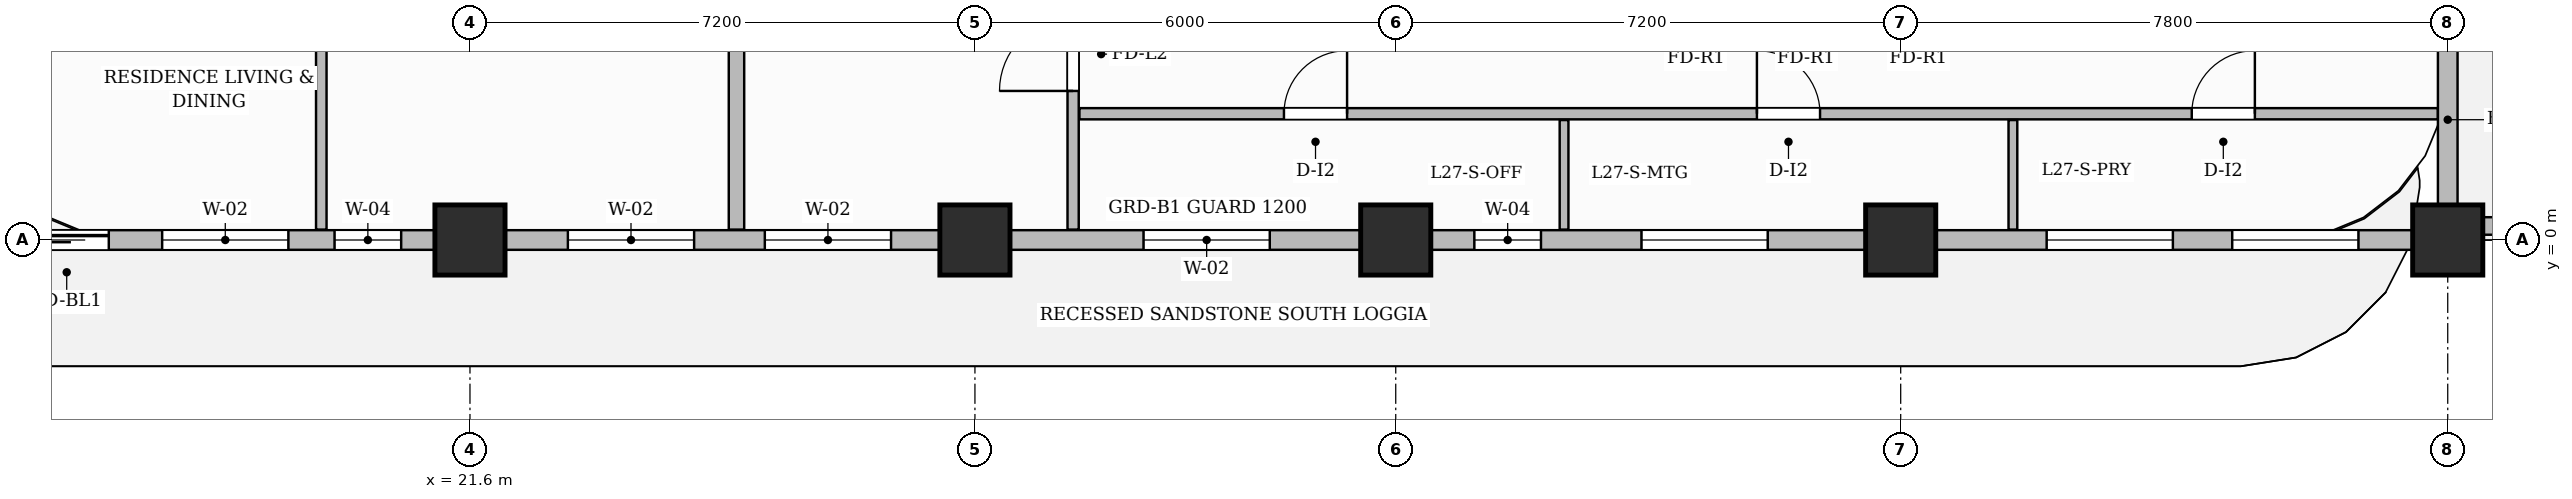
"""IFC4 building model, lengths in metres.
Left out: names, types, materials, properties, quantities, classifications, styles, units other than length and angle.
Written with IfcOpenShell. Run it as: python <this file> out.ifc"""

import sys

from ifc_helpers import new_model, si_unit, direction, frame, frame_2d, origin, origin_2d, place, context, subcontext, project, spatial, rectangle, extrude, source, transform, mapped, element, fill, save


model = new_model("IFC4")
c1 = context("Model", 3, precision=1e-05, world=origin(), true_north=direction((0.0, 1.0)))
c2 = subcontext(c1, "Body", "Model", "MODEL_VIEW")
j1 = project(units=[si_unit("LENGTHUNIT", "METRE"), si_unit("PLANEANGLEUNIT", "RADIAN")], contexts=[c1])
p1 = place(None, origin())
s1 = spatial("IfcSite", under=j1, at=p1, CompositionType="ELEMENT")
p2 = place(p1, origin())
s2 = spatial("IfcBuilding", under=s1, at=p2, CompositionType="ELEMENT")
p3 = place(p2, frame((0.0, 0.0, 111.8)))
s3 = spatial("IfcBuildingStorey", under=s2, at=p3, CompositionType="ELEMENT", Elevation=111.8)
m1 = source(origin(), c2, "Body", "SweptSolid", [
    extrude(rectangle(XDim=1.0, YDim=1.0, at=origin_2d()), origin(), (0.0, 0.0, 1.0), 3.7),
])
for number, where, z_axis, x_axis in (
    (1, (21.6, 0.0, 0.0), (0.0, 0.0, 1.0), (1.0, 0.0, 0.0)),
    (2, (28.8, 0.0, 0.0), (0.0, 0.0, 1.0), (1.0, 0.0, 0.0)),
    (3, (34.8, 0.0, 0.0), (0.0, 0.0, 1.0), (1.0, 0.0, 0.0)),
    (4, (42.0, 0.0, 0.0), (0.0, 0.0, 1.0), (1.0, 0.0, 0.0)),
    (5, (49.8, 0.0, 0.0), (0.0, 0.0, 1.0), (1.0, 0.0, 0.0)),
):
    element("IfcColumn", number, at=place(p3, frame(where, z_axis=z_axis, x_axis=x_axis)), inside=s3, PredefinedType="COLUMN", context=c2, shape_type="MappedRepresentation", body=[
        mapped(m1, transform((0.0, 0.0, 0.0), scale=1.0)),
    ])
p4 = place(p3, frame((30.2, 0.148, 0.0), z_axis=(0.0, 0.0, 1.0), x_axis=(0.0, 1.0, 0.0)))
e6 = element("IfcWall", 6, at=p4, inside=s3, PredefinedType="PARTITIONING", context=c2, shape_type="SweptSolid", body=[
    extrude(rectangle(XDim=9.512, YDim=0.16, at=frame_2d((4.756, 0.0))), origin(), (0.0, 0.0, 1.0), 3.45),
])
p5 = place(p4, frame((1.977, 0.0, 0.0)))
e7 = element("IfcOpeningElement", 7, at=p5, cuts=e6, PredefinedType="OPENING", context=c2, shape_type="SweptSolid", body=[
    extrude(rectangle(XDim=1.05, YDim=2.15, at=frame_2d((0.525, 1.075))), frame((0.0, 0.09, 0.0), z_axis=(0.0, -1.0, 0.0), x_axis=(1.0, 0.0, 0.0)), (0.0, 0.0, 1.0), 0.18),
])
p6 = place(p3, frame((30.29, 1.8, 0.0), z_axis=(0.0, 0.0, 1.0), x_axis=(1.0, 0.0, 0.0)))
e8 = element("IfcWall", 8, at=p6, inside=s3, PredefinedType="PARTITIONING", context=c2, shape_type="SweptSolid", body=[
    extrude(rectangle(XDim=19.37, YDim=0.16, at=frame_2d((9.685, 0.0))), origin(), (0.0, 0.0, 1.0), 3.45),
])
p7 = place(p6, frame((2.916, 0.0, 0.0)))
e9 = element("IfcOpeningElement", 9, at=p7, cuts=e8, PredefinedType="OPENING", context=c2, shape_type="SweptSolid", body=[
    extrude(rectangle(XDim=0.9, YDim=2.15, at=frame_2d((0.45, 1.075))), frame((0.0, 0.09, 0.0), z_axis=(0.0, -1.0, 0.0), x_axis=(1.0, 0.0, 0.0)), (0.0, 0.0, 1.0), 0.18),
])
p8 = place(p6, frame((9.66, 0.0, 0.0)))
e10 = element("IfcOpeningElement", 10, at=p8, cuts=e8, PredefinedType="OPENING", context=c2, shape_type="SweptSolid", body=[
    extrude(rectangle(XDim=0.9, YDim=2.15, at=frame_2d((0.45, 1.075))), frame((0.0, 0.09, 0.0), z_axis=(0.0, -1.0, 0.0), x_axis=(1.0, 0.0, 0.0)), (0.0, 0.0, 1.0), 0.18),
])
p9 = place(p6, frame((15.86, 0.0, 0.0)))
e11 = element("IfcOpeningElement", 11, at=p9, cuts=e8, PredefinedType="OPENING", context=c2, shape_type="SweptSolid", body=[
    extrude(rectangle(XDim=0.9, YDim=2.15, at=frame_2d((0.45, 1.075))), frame((0.0, 0.09, 0.0), z_axis=(0.0, -1.0, 0.0), x_axis=(1.0, 0.0, 0.0)), (0.0, 0.0, 1.0), 0.18),
])
for number, where, z_axis, x_axis in (
    (12, (37.2, 0.148, 0.0), (0.0, 0.0, 1.0), (0.0, 1.0, 0.0)),
    (13, (43.6, 0.148, 0.0), (0.0, 0.0, 1.0), (0.0, 1.0, 0.0)),
):
    element("IfcWall", number, at=place(p3, frame(where, z_axis=z_axis, x_axis=x_axis)), inside=s3, PredefinedType="PARTITIONING", context=c2, shape_type="SweptSolid", body=[
        extrude(rectangle(XDim=1.562, YDim=0.125, at=frame_2d((0.781, 0.0))), origin(), (0.0, 0.0, 1.0), 3.45),
    ])
p10 = place(p3, frame((25.4, 0.148, 0.0), z_axis=(0.0, 0.0, 1.0), x_axis=(0.0, 1.0, 0.0)))
e14 = element("IfcWall", 14, at=p10, inside=s3, PredefinedType="PARTITIONING", context=c2, shape_type="SweptSolid", body=[
    extrude(rectangle(XDim=9.512, YDim=0.22, at=frame_2d((4.756, 0.0))), origin(), (0.0, 0.0, 1.0), 3.105),
])
p11 = place(p3, frame((19.48, 0.148, 0.0), z_axis=(0.0, 0.0, 1.0), x_axis=(0.0, 1.0, 0.0)))
e15 = element("IfcWall", 15, at=p11, inside=s3, PredefinedType="PARTITIONING", context=c2, shape_type="SweptSolid", body=[
    extrude(rectangle(XDim=9.512, YDim=0.15, at=frame_2d((4.756, 0.0))), origin(), (0.0, 0.0, 1.0), 3.45),
])
p12 = place(p11, frame((8.077, 0.0, 0.0)))
e16 = element("IfcOpeningElement", 16, at=p12, cuts=e15, PredefinedType="OPENING", context=c2, shape_type="SweptSolid", body=[
    extrude(rectangle(XDim=0.9, YDim=2.15, at=frame_2d((0.45, 1.075))), frame((0.0, 0.085, 0.0), z_axis=(0.0, -1.0, 0.0), x_axis=(1.0, 0.0, 0.0)), (0.0, 0.0, 1.0), 0.17),
])
p13 = place(p3, frame((14.4, 0.0, 0.0), z_axis=(0.0, 0.0, 1.0), x_axis=(1.0, 0.0, 0.0)))
e17 = element("IfcWall", 17, at=p13, inside=s3, PredefinedType="SOLIDWALL", context=c2, shape_type="SweptSolid", body=[
    extrude(rectangle(XDim=35.4, YDim=0.28, at=frame_2d((17.7, 0.0))), origin(), (0.0, 0.0, 1.0), 2.935),
])
p14 = place(p13, frame((0.85, 0.0, 0.0)))
e18 = element("IfcOpeningElement", 18, at=p14, cuts=e17, PredefinedType="OPENING", context=c2, shape_type="SweptSolid", body=[
    extrude(rectangle(XDim=1.2, YDim=2.2, at=frame_2d((0.6, 1.1))), frame((0.0, 0.15, 0.0), z_axis=(0.0, -1.0, 0.0), x_axis=(1.0, 0.0, 0.0)), (0.0, 0.0, 1.0), 0.3),
])
p15 = place(p13, frame((2.811, 0.0, 0.8)))
e19 = element("IfcOpeningElement", 19, at=p15, cuts=e17, PredefinedType="OPENING", context=c2, shape_type="SweptSolid", body=[
    extrude(rectangle(XDim=1.8, YDim=1.85, at=frame_2d((0.9, 0.925))), frame((0.0, 0.15, 0.0), z_axis=(0.0, -1.0, 0.0), x_axis=(1.0, 0.0, 0.0)), (0.0, 0.0, 1.0), 0.3),
])
p16 = place(p13, frame((5.269, 0.0, 0.8)))
e20 = element("IfcOpeningElement", 20, at=p16, cuts=e17, PredefinedType="OPENING", context=c2, shape_type="SweptSolid", body=[
    extrude(rectangle(XDim=0.95, YDim=1.75, at=frame_2d((0.475, 0.875))), frame((0.0, 0.15, 0.0), z_axis=(0.0, -1.0, 0.0), x_axis=(1.0, 0.0, 0.0)), (0.0, 0.0, 1.0), 0.3),
])
p17 = place(p13, frame((8.596, 0.0, 0.8)))
e21 = element("IfcOpeningElement", 21, at=p17, cuts=e17, PredefinedType="OPENING", context=c2, shape_type="SweptSolid", body=[
    extrude(rectangle(XDim=1.8, YDim=1.85, at=frame_2d((0.9, 0.925))), frame((0.0, 0.15, 0.0), z_axis=(0.0, -1.0, 0.0), x_axis=(1.0, 0.0, 0.0)), (0.0, 0.0, 1.0), 0.3),
])
p18 = place(p13, frame((11.404, 0.0, 0.8)))
e22 = element("IfcOpeningElement", 22, at=p18, cuts=e17, PredefinedType="OPENING", context=c2, shape_type="SweptSolid", body=[
    extrude(rectangle(XDim=1.8, YDim=1.85, at=frame_2d((0.9, 0.925))), frame((0.0, 0.15, 0.0), z_axis=(0.0, -1.0, 0.0), x_axis=(1.0, 0.0, 0.0)), (0.0, 0.0, 1.0), 0.3),
])
p19 = place(p13, frame((16.804, 0.0, 0.8)))
e23 = element("IfcOpeningElement", 23, at=p19, cuts=e17, PredefinedType="OPENING", context=c2, shape_type="SweptSolid", body=[
    extrude(rectangle(XDim=1.8, YDim=1.85, at=frame_2d((0.9, 0.925))), frame((0.0, 0.15, 0.0), z_axis=(0.0, -1.0, 0.0), x_axis=(1.0, 0.0, 0.0)), (0.0, 0.0, 1.0), 0.3),
])
p20 = place(p13, frame((21.521, 0.0, 0.8)))
e24 = element("IfcOpeningElement", 24, at=p20, cuts=e17, PredefinedType="OPENING", context=c2, shape_type="SweptSolid", body=[
    extrude(rectangle(XDim=0.95, YDim=1.75, at=frame_2d((0.475, 0.875))), frame((0.0, 0.15, 0.0), z_axis=(0.0, -1.0, 0.0), x_axis=(1.0, 0.0, 0.0)), (0.0, 0.0, 1.0), 0.3),
])
p21 = place(p13, frame((23.904, 0.0, 0.8)))
e25 = element("IfcOpeningElement", 25, at=p21, cuts=e17, PredefinedType="OPENING", context=c2, shape_type="SweptSolid", body=[
    extrude(rectangle(XDim=1.8, YDim=1.85, at=frame_2d((0.9, 0.925))), frame((0.0, 0.15, 0.0), z_axis=(0.0, -1.0, 0.0), x_axis=(1.0, 0.0, 0.0)), (0.0, 0.0, 1.0), 0.3),
])
p22 = place(p13, frame((29.681, 0.0, 0.8)))
e26 = element("IfcOpeningElement", 26, at=p22, cuts=e17, PredefinedType="OPENING", context=c2, shape_type="SweptSolid", body=[
    extrude(rectangle(XDim=1.8, YDim=1.85, at=frame_2d((0.9, 0.925))), frame((0.0, 0.15, 0.0), z_axis=(0.0, -1.0, 0.0), x_axis=(1.0, 0.0, 0.0)), (0.0, 0.0, 1.0), 0.3),
])
p23 = place(p13, frame((32.327, 0.0, 0.8)))
e27 = element("IfcOpeningElement", 27, at=p23, cuts=e17, PredefinedType="OPENING", context=c2, shape_type="SweptSolid", body=[
    extrude(rectangle(XDim=1.8, YDim=1.85, at=frame_2d((0.9, 0.925))), frame((0.0, 0.15, 0.0), z_axis=(0.0, -1.0, 0.0), x_axis=(1.0, 0.0, 0.0)), (0.0, 0.0, 1.0), 0.3),
])
p24 = place(p3, frame((49.8, 0.05, 0.0), z_axis=(0.0, 0.0, 1.0), x_axis=(0.0, 1.0, 0.0)))
e28 = element("IfcWall", 28, at=p24, inside=s3, PredefinedType="SOLIDWALL", context=c2, shape_type="SweptSolid", body=[
    extrude(rectangle(XDim=3.33, YDim=0.28, at=frame_2d((1.665, 0.0))), origin(), (0.0, 0.0, 1.0), 3.45),
])
p25 = place(p3, frame((55.187, 0.2, 0.0), z_axis=(0.0, 0.0, 1.0), x_axis=(-1.0, 0.0, 0.0)))
e29 = element("IfcWall", 29, at=p25, inside=s3, PredefinedType="PARAPET", context=c2, shape_type="SweptSolid", body=[
    extrude(rectangle(XDim=5.127, YDim=0.25, at=frame_2d((2.563, 0.0))), origin(), (0.0, 0.0, 1.0), 0.95),
])
m2 = source(origin(), c2, "Body", "SweptSolid", [
    extrude(rectangle(XDim=1.05, YDim=2.15, at=frame_2d((0.525, 1.075))), frame((0.0, 0.025, 0.0), z_axis=(0.0, -1.0, 0.0), x_axis=(1.0, 0.0, 0.0)), (0.0, 0.0, 1.0), 0.05),
])
p26 = place(p5, origin())
e30 = element("IfcDoor", 30, at=p26, inside=s3, OperationType="SINGLE_SWING_LEFT", PredefinedType="DOOR", context=c2, shape_type="MappedRepresentation", body=[
    mapped(m2, transform((0.0, 0.0, 0.0), scale=1.0)),
])
fill(e7, e30)
m3 = source(origin(), c2, "Body", "SweptSolid", [
    extrude(rectangle(XDim=0.9, YDim=2.15, at=frame_2d((0.45, 1.075))), frame((0.0, 0.025, 0.0), z_axis=(0.0, -1.0, 0.0), x_axis=(1.0, 0.0, 0.0)), (0.0, 0.0, 1.0), 0.05),
])
p27 = place(p7, origin())
e31 = element("IfcDoor", 31, at=p27, inside=s3, OperationType="SINGLE_SWING_RIGHT", PredefinedType="DOOR", context=c2, shape_type="MappedRepresentation", body=[
    mapped(m3, transform((0.0, 0.0, 0.0), scale=1.0)),
])
fill(e9, e31)
p28 = place(p8, origin())
e32 = element("IfcDoor", 32, at=p28, inside=s3, OperationType="SINGLE_SWING_LEFT", PredefinedType="DOOR", context=c2, shape_type="MappedRepresentation", body=[
    mapped(m3, transform((0.0, 0.0, 0.0), scale=1.0)),
])
fill(e10, e32)
p29 = place(p9, origin())
e33 = element("IfcDoor", 33, at=p29, inside=s3, OperationType="SINGLE_SWING_RIGHT", PredefinedType="DOOR", context=c2, shape_type="MappedRepresentation", body=[
    mapped(m3, transform((0.0, 0.0, 0.0), scale=1.0)),
])
fill(e11, e33)
m4 = source(origin(), c2, "Body", "SweptSolid", [
    extrude(rectangle(XDim=1.2, YDim=2.2, at=frame_2d((0.6, 1.1))), frame((0.0, 0.025, 0.0), z_axis=(0.0, -1.0, 0.0), x_axis=(1.0, 0.0, 0.0)), (0.0, 0.0, 1.0), 0.05),
])
p30 = place(p14, origin())
e34 = element("IfcDoor", 34, at=p30, inside=s3, OperationType="SLIDING_TO_LEFT", PredefinedType="DOOR", context=c2, shape_type="MappedRepresentation", body=[
    mapped(m4, transform((0.0, 0.0, 0.0), scale=1.0)),
])
fill(e18, e34)
m5 = source(origin(), c2, "Body", "SweptSolid", [
    extrude(rectangle(XDim=1.8, YDim=1.85, at=frame_2d((0.9, 0.925))), frame((0.0, 0.03, 0.0), z_axis=(0.0, -1.0, 0.0), x_axis=(1.0, 0.0, 0.0)), (0.0, 0.0, 1.0), 0.06),
])
p31 = place(p15, origin())
e35 = element("IfcWindow", 35, at=p31, inside=s3, PartitioningType="DOUBLE_PANEL_VERTICAL", PredefinedType="WINDOW", context=c2, shape_type="MappedRepresentation", body=[
    mapped(m5, transform((0.0, 0.0, 0.0), scale=1.0)),
])
fill(e19, e35)
m6 = source(origin(), c2, "Body", "SweptSolid", [
    extrude(rectangle(XDim=0.95, YDim=1.75, at=frame_2d((0.475, 0.875))), frame((0.0, 0.03, 0.0), z_axis=(0.0, -1.0, 0.0), x_axis=(1.0, 0.0, 0.0)), (0.0, 0.0, 1.0), 0.06),
])
p32 = place(p16, origin())
e36 = element("IfcWindow", 36, at=p32, inside=s3, PartitioningType="SINGLE_PANEL", PredefinedType="WINDOW", context=c2, shape_type="MappedRepresentation", body=[
    mapped(m6, transform((0.0, 0.0, 0.0), scale=1.0)),
])
fill(e20, e36)
p33 = place(p17, origin())
e37 = element("IfcWindow", 37, at=p33, inside=s3, PartitioningType="DOUBLE_PANEL_VERTICAL", PredefinedType="WINDOW", context=c2, shape_type="MappedRepresentation", body=[
    mapped(m5, transform((0.0, 0.0, 0.0), scale=1.0)),
])
fill(e21, e37)
p34 = place(p18, origin())
e38 = element("IfcWindow", 38, at=p34, inside=s3, PartitioningType="DOUBLE_PANEL_VERTICAL", PredefinedType="WINDOW", context=c2, shape_type="MappedRepresentation", body=[
    mapped(m5, transform((0.0, 0.0, 0.0), scale=1.0)),
])
fill(e22, e38)
p35 = place(p19, origin())
e39 = element("IfcWindow", 39, at=p35, inside=s3, PartitioningType="DOUBLE_PANEL_VERTICAL", PredefinedType="WINDOW", context=c2, shape_type="MappedRepresentation", body=[
    mapped(m5, transform((0.0, 0.0, 0.0), scale=1.0)),
])
fill(e23, e39)
p36 = place(p20, origin())
e40 = element("IfcWindow", 40, at=p36, inside=s3, PartitioningType="SINGLE_PANEL", PredefinedType="WINDOW", context=c2, shape_type="MappedRepresentation", body=[
    mapped(m6, transform((0.0, 0.0, 0.0), scale=1.0)),
])
fill(e24, e40)
p37 = place(p21, origin())
e41 = element("IfcWindow", 41, at=p37, inside=s3, PartitioningType="DOUBLE_PANEL_VERTICAL", PredefinedType="WINDOW", context=c2, shape_type="MappedRepresentation", body=[
    mapped(m5, transform((0.0, 0.0, 0.0), scale=1.0)),
])
fill(e25, e41)
p38 = place(p22, origin())
e42 = element("IfcWindow", 42, at=p38, inside=s3, PartitioningType="DOUBLE_PANEL_VERTICAL", PredefinedType="WINDOW", context=c2, shape_type="MappedRepresentation", body=[
    mapped(m5, transform((0.0, 0.0, 0.0), scale=1.0)),
])
fill(e26, e42)
p39 = place(p23, origin())
e43 = element("IfcWindow", 43, at=p39, inside=s3, PartitioningType="DOUBLE_PANEL_VERTICAL", PredefinedType="WINDOW", context=c2, shape_type="MappedRepresentation", body=[
    mapped(m5, transform((0.0, 0.0, 0.0), scale=1.0)),
])
fill(e27, e43)
save(model, sys.argv[1])
